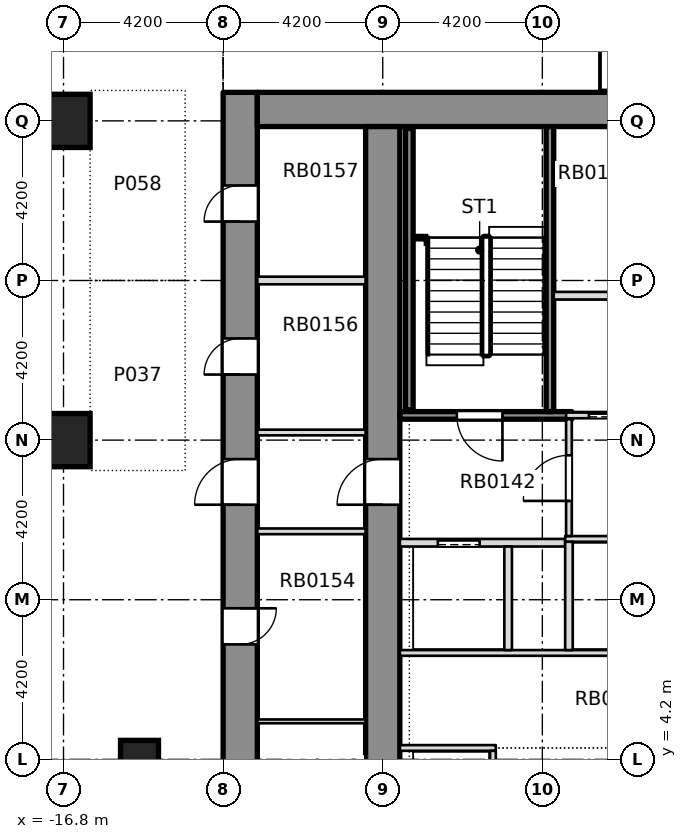
"""IFC4 building model, lengths in metres.
Left out: names, types, materials, properties, quantities, classifications, styles, units other than length and angle.
Written with IfcOpenShell. Run it as: python <this file> out.ifc"""

import sys

from ifc_helpers import new_model, si_unit, direction, frame, frame_2d, origin, origin_2d, place, context, subcontext, project, spatial, rectangle, extrude, element, fill, save


model = new_model("IFC4")
c1 = context("Model", 3, precision=1e-05, world=origin(), true_north=direction((0.0, 1.0)))
c2 = subcontext(c1, "Body", "Model", "MODEL_VIEW")
j1 = project(units=[si_unit("LENGTHUNIT", "METRE"), si_unit("PLANEANGLEUNIT", "RADIAN")], contexts=[c1])
p1 = place(None, origin())
s1 = spatial("IfcSite", under=j1, at=p1, CompositionType="ELEMENT")
p2 = place(p1, origin())
s2 = spatial("IfcBuilding", under=s1, at=p2, CompositionType="ELEMENT")
p3 = place(p2, frame((0.0, 0.0, -4.2)))
s3 = spatial("IfcBuildingStorey", under=s2, at=p3, CompositionType="ELEMENT", Elevation=-4.2)
p4 = place(p3, frame((-12.15, -8.4, -0.35), z_axis=(0.0, 0.0, 1.0), x_axis=(0.0, 1.0, 0.0)))
e1 = element("IfcWall", 1, at=p4, inside=s3, PredefinedType="SHEAR", context=c2, shape_type="SweptSolid", body=[
    extrude(rectangle(XDim=30.15, YDim=0.9, at=frame_2d((15.075, 0.0))), origin(), (0.0, 0.0, 1.0), 4.1),
])
p5 = place(p4, frame((3.425, 0.0, 0.35)))
e2 = element("IfcOpeningElement", 2, at=p5, cuts=e1, PredefinedType="OPENING", context=c2, shape_type="SweptSolid", body=[
    extrude(rectangle(XDim=0.95, YDim=2.1, at=frame_2d((0.475, 1.05))), frame((0.0, 0.46, 0.0), z_axis=(0.0, -1.0, 0.0), x_axis=(1.0, 0.0, 0.0)), (0.0, 0.0, 1.0), 0.92),
])
p6 = place(p4, frame((8.075, 0.0, 0.35)))
e3 = element("IfcOpeningElement", 3, at=p6, cuts=e1, PredefinedType="OPENING", context=c2, shape_type="SweptSolid", body=[
    extrude(rectangle(XDim=0.95, YDim=2.1, at=frame_2d((0.475, 1.05))), frame((0.0, 0.46, 0.0), z_axis=(0.0, -1.0, 0.0), x_axis=(1.0, 0.0, 0.0)), (0.0, 0.0, 1.0), 0.92),
])
p7 = place(p4, frame((11.425, 0.0, 0.35)))
e4 = element("IfcOpeningElement", 4, at=p7, cuts=e1, PredefinedType="OPENING", context=c2, shape_type="SweptSolid", body=[
    extrude(rectangle(XDim=0.95, YDim=2.1, at=frame_2d((0.475, 1.05))), frame((0.0, 0.46, 0.0), z_axis=(0.0, -1.0, 0.0), x_axis=(1.0, 0.0, 0.0)), (0.0, 0.0, 1.0), 0.92),
])
p8 = place(p4, frame((15.625, 0.0, 0.35)))
e5 = element("IfcOpeningElement", 5, at=p8, cuts=e1, PredefinedType="OPENING", context=c2, shape_type="SweptSolid", body=[
    extrude(rectangle(XDim=0.95, YDim=2.1, at=frame_2d((0.475, 1.05))), frame((0.0, 0.46, 0.0), z_axis=(0.0, -1.0, 0.0), x_axis=(1.0, 0.0, 0.0)), (0.0, 0.0, 1.0), 0.92),
])
p9 = place(p4, frame((22.725, 0.0, 0.35)))
e6 = element("IfcOpeningElement", 6, at=p9, cuts=e1, PredefinedType="OPENING", context=c2, shape_type="SweptSolid", body=[
    extrude(rectangle(XDim=0.95, YDim=2.1, at=frame_2d((0.475, 1.05))), frame((0.0, 0.46, 0.0), z_axis=(0.0, -1.0, 0.0), x_axis=(1.0, 0.0, 0.0)), (0.0, 0.0, 1.0), 0.92),
])
p10 = place(p4, frame((26.75, 0.0, 0.35)))
e7 = element("IfcOpeningElement", 7, at=p10, cuts=e1, PredefinedType="OPENING", context=c2, shape_type="SweptSolid", body=[
    extrude(rectangle(XDim=0.95, YDim=2.1, at=frame_2d((0.475, 1.05))), frame((0.0, 0.46, 0.0), z_axis=(0.0, -1.0, 0.0), x_axis=(1.0, 0.0, 0.0)), (0.0, 0.0, 1.0), 0.92),
])
p11 = place(p4, frame((19.3, 0.0, 0.35)))
e8 = element("IfcOpeningElement", 8, at=p11, cuts=e1, PredefinedType="OPENING", context=c2, shape_type="SweptSolid", body=[
    extrude(rectangle(XDim=1.2, YDim=2.1, at=frame_2d((0.6, 1.05))), frame((0.0, 0.46, 0.0), z_axis=(0.0, -1.0, 0.0), x_axis=(1.0, 0.0, 0.0)), (0.0, 0.0, 1.0), 0.92),
])
p12 = place(p3, frame((-11.7, 21.3, -0.35), z_axis=(0.0, 0.0, 1.0), x_axis=(1.0, 0.0, 0.0)))
e9 = element("IfcWall", 9, at=p12, inside=s3, PredefinedType="SOLIDWALL", context=c2, shape_type="SweptSolid", body=[
    extrude(rectangle(XDim=23.4, YDim=0.9, at=frame_2d((11.7, 0.0))), origin(), (0.0, 0.0, 1.0), 4.1),
])
p13 = place(p3, frame((-8.4, -7.5, -0.35), z_axis=(0.0, 0.0, 1.0), x_axis=(0.0, 1.0, 0.0)))
e10 = element("IfcWall", 10, at=p13, inside=s3, PredefinedType="SHEAR", context=c2, shape_type="SweptSolid", body=[
    extrude(rectangle(XDim=28.35, YDim=0.9, at=frame_2d((14.175, 0.0))), origin(), (0.0, 0.0, 1.0), 4.1),
])
p14 = place(p13, frame((18.4, 0.0, 0.35)))
e11 = element("IfcOpeningElement", 11, at=p14, cuts=e10, PredefinedType="OPENING", context=c2, shape_type="SweptSolid", body=[
    extrude(rectangle(XDim=1.2, YDim=2.1, at=frame_2d((0.6, 1.05))), frame((0.0, 0.46, 0.0), z_axis=(0.0, -1.0, 0.0), x_axis=(1.0, 0.0, 0.0)), (0.0, 0.0, 1.0), 0.92),
])
for number, where, z_axis, x_axis in (
    (12, (-16.8, 12.6, -0.35), (0.0, 0.0, 1.0), (1.0, 0.0, 0.0)),
    (13, (-16.8, 21.0, -0.35), (0.0, 0.0, 1.0), (1.0, 0.0, 0.0)),
):
    element("IfcColumn", number, at=place(p3, frame(where, z_axis=z_axis, x_axis=x_axis)), inside=s3, PredefinedType="COLUMN", context=c2, shape_type="SweptSolid", body=[
        extrude(rectangle(XDim=1.4, YDim=1.4, at=origin_2d()), origin(), (0.0, 0.0, 1.0), 4.1),
    ])
p15 = place(p3, frame((-14.8, 4.2, -0.35), z_axis=(0.0, 0.0, 1.0), x_axis=(1.0, 0.0, 0.0)))
e14 = element("IfcColumn", 14, at=p15, inside=s3, PredefinedType="COLUMN", context=c2, shape_type="SweptSolid", body=[
    extrude(rectangle(XDim=1.0, YDim=1.0, at=origin_2d()), origin(), (0.0, 0.0, 1.0), 4.1),
])
p16 = place(p3, frame((-7.949, 4.5, 0.0), z_axis=(0.0, 0.0, 1.0), x_axis=(1.0, 0.0, 0.0)))
e15 = element("IfcWall", 15, at=p16, inside=s3, PredefinedType="PARTITIONING", context=c2, shape_type="SweptSolid", body=[
    extrude(rectangle(XDim=2.524, YDim=0.15, at=frame_2d((1.262, 0.0))), origin(), (0.0, 0.0, 1.0), 3.75),
])
p17 = place(p3, frame((-7.949, 7.0, 0.0), z_axis=(0.0, 0.0, 1.0), x_axis=(1.0, 0.0, 0.0)))
e16 = element("IfcWall", 16, at=p17, inside=s3, PredefinedType="PARTITIONING", context=c2, shape_type="SweptSolid", body=[
    extrude(rectangle(XDim=15.898, YDim=0.15, at=frame_2d((7.949, 0.0))), origin(), (0.0, 0.0, 1.0), 3.75),
])
p18 = place(p17, frame((7.249, 0.0, 0.0)))
e17 = element("IfcOpeningElement", 17, at=p18, cuts=e16, PredefinedType="OPENING", context=c2, shape_type="SweptSolid", body=[
    extrude(rectangle(XDim=1.4, YDim=2.1, at=frame_2d((0.7, 1.05))), frame((0.0, 0.085, 0.0), z_axis=(0.0, -1.0, 0.0), x_axis=(1.0, 0.0, 0.0)), (0.0, 0.0, 1.0), 0.17),
])
p19 = place(p3, frame((-7.949, 9.9, 0.0), z_axis=(0.0, 0.0, 1.0), x_axis=(1.0, 0.0, 0.0)))
e18 = element("IfcWall", 18, at=p19, inside=s3, PredefinedType="PARTITIONING", context=c2, shape_type="SweptSolid", body=[
    extrude(rectangle(XDim=4.349, YDim=0.2, at=frame_2d((2.174, 0.0))), origin(), (0.0, 0.0, 1.0), 3.75),
])
p20 = place(p19, frame((0.999, 0.0, 0.0)))
e19 = element("IfcOpeningElement", 19, at=p20, cuts=e18, PredefinedType="OPENING", context=c2, shape_type="SweptSolid", body=[
    extrude(rectangle(XDim=1.1, YDim=2.1, at=frame_2d((0.55, 1.05))), frame((0.0, 0.11, 0.0), z_axis=(0.0, -1.0, 0.0), x_axis=(1.0, 0.0, 0.0)), (0.0, 0.0, 1.0), 0.22),
])
p21 = place(p3, frame((-3.6, 10.0, 0.0), z_axis=(0.0, 0.0, 1.0), x_axis=(1.0, 0.0, 0.0)))
e20 = element("IfcWall", 20, at=p21, inside=s3, PredefinedType="PARTITIONING", context=c2, shape_type="SweptSolid", body=[
    extrude(rectangle(XDim=7.2, YDim=0.15, at=frame_2d((3.6, 0.0))), origin(), (0.0, 0.0, 1.0), 3.75),
])
p22 = place(p21, frame((2.9, 0.0, 0.0)))
e21 = element("IfcOpeningElement", 21, at=p22, cuts=e20, PredefinedType="OPENING", context=c2, shape_type="SweptSolid", body=[
    extrude(rectangle(XDim=1.4, YDim=2.1, at=frame_2d((0.7, 1.05))), frame((0.0, 0.085, 0.0), z_axis=(0.0, -1.0, 0.0), x_axis=(1.0, 0.0, 0.0)), (0.0, 0.0, 1.0), 0.17),
])
p23 = place(p3, frame((-7.949, 13.25, 0.0), z_axis=(0.0, 0.0, 1.0), x_axis=(1.0, 0.0, 0.0)))
e22 = element("IfcWall", 22, at=p23, inside=s3, PredefinedType="SOLIDWALL", context=c2, shape_type="SweptSolid", body=[
    extrude(rectangle(XDim=4.524, YDim=0.2, at=frame_2d((2.262, 0.0))), origin(), (0.0, 0.0, 1.0), 3.75),
])
p24 = place(p23, frame((1.499, 0.0, 0.0)))
e23 = element("IfcOpeningElement", 23, at=p24, cuts=e22, PredefinedType="OPENING", context=c2, shape_type="SweptSolid", body=[
    extrude(rectangle(XDim=1.2, YDim=2.1, at=frame_2d((0.6, 1.05))), frame((0.0, 0.11, 0.0), z_axis=(0.0, -1.0, 0.0), x_axis=(1.0, 0.0, 0.0)), (0.0, 0.0, 1.0), 0.22),
])
p25 = place(p3, frame((-3.575, 13.25, 0.0), z_axis=(0.0, 0.0, 1.0), x_axis=(1.0, 0.0, 0.0)))
e24 = element("IfcWall", 24, at=p25, inside=s3, PredefinedType="PARTITIONING", context=c2, shape_type="SweptSolid", body=[
    extrude(rectangle(XDim=7.15, YDim=0.15, at=frame_2d((3.575, 0.0))), origin(), (0.0, 0.0, 1.0), 3.75),
])
p26 = place(p25, frame((0.6, 0.0, 0.0)))
e25 = element("IfcOpeningElement", 25, at=p26, cuts=e24, PredefinedType="OPENING", context=c2, shape_type="SweptSolid", body=[
    extrude(rectangle(XDim=1.2, YDim=2.1, at=frame_2d((0.6, 1.05))), frame((0.0, 0.085, 0.0), z_axis=(0.0, -1.0, 0.0), x_axis=(1.0, 0.0, 0.0)), (0.0, 0.0, 1.0), 0.17),
])
p27 = place(p25, frame((5.4, 0.0, 0.0)))
e26 = element("IfcOpeningElement", 26, at=p27, cuts=e24, PredefinedType="OPENING", context=c2, shape_type="SweptSolid", body=[
    extrude(rectangle(XDim=1.1, YDim=2.1, at=frame_2d((0.55, 1.05))), frame((0.0, 0.085, 0.0), z_axis=(0.0, -1.0, 0.0), x_axis=(1.0, 0.0, 0.0)), (0.0, 0.0, 1.0), 0.17),
])
p28 = place(p25, frame((2.975, 0.0, 0.0)))
e27 = element("IfcOpeningElement", 27, at=p28, cuts=e24, PredefinedType="OPENING", context=c2, shape_type="SweptSolid", body=[
    extrude(rectangle(XDim=1.2, YDim=2.1, at=frame_2d((0.6, 1.05))), frame((0.0, 0.085, 0.0), z_axis=(0.0, -1.0, 0.0), x_axis=(1.0, 0.0, 0.0)), (0.0, 0.0, 1.0), 0.17),
])
p29 = place(p3, frame((-3.9, 16.4, 0.0), z_axis=(0.0, 0.0, 1.0), x_axis=(1.0, 0.0, 0.0)))
e28 = element("IfcWall", 28, at=p29, inside=s3, PredefinedType="PARTITIONING", context=c2, shape_type="SweptSolid", body=[
    extrude(rectangle(XDim=3.05, YDim=0.2, at=frame_2d((1.525, 0.0))), origin(), (0.0, 0.0, 1.0), 3.75),
])
p30 = place(p3, frame((-5.5, -7.499, 0.0), z_axis=(0.0, 0.0, 1.0), x_axis=(0.0, 1.0, 0.0)))
e29 = element("IfcWall", 29, at=p30, inside=s3, PredefinedType="PARTITIONING", context=c2, shape_type="SweptSolid", body=[
    extrude(rectangle(XDim=11.924, YDim=0.15, at=frame_2d((5.962, 0.0))), origin(), (0.0, 0.0, 1.0), 3.75),
])
p31 = place(p30, frame((0.949, 0.0, 0.0)))
e30 = element("IfcOpeningElement", 30, at=p31, cuts=e29, PredefinedType="OPENING", context=c2, shape_type="SweptSolid", body=[
    extrude(rectangle(XDim=1.1, YDim=2.1, at=frame_2d((0.55, 1.05))), frame((0.0, 0.085, 0.0), z_axis=(0.0, -1.0, 0.0), x_axis=(1.0, 0.0, 0.0)), (0.0, 0.0, 1.0), 0.17),
])
p32 = place(p30, frame((3.949, 0.0, 0.0)))
e31 = element("IfcOpeningElement", 31, at=p32, cuts=e29, PredefinedType="OPENING", context=c2, shape_type="SweptSolid", body=[
    extrude(rectangle(XDim=1.1, YDim=2.1, at=frame_2d((0.55, 1.05))), frame((0.0, 0.085, 0.0), z_axis=(0.0, -1.0, 0.0), x_axis=(1.0, 0.0, 0.0)), (0.0, 0.0, 1.0), 0.17),
])
p33 = place(p30, frame((6.949, 0.0, 0.0)))
e32 = element("IfcOpeningElement", 32, at=p33, cuts=e29, PredefinedType="OPENING", context=c2, shape_type="SweptSolid", body=[
    extrude(rectangle(XDim=1.1, YDim=2.1, at=frame_2d((0.55, 1.05))), frame((0.0, 0.085, 0.0), z_axis=(0.0, -1.0, 0.0), x_axis=(1.0, 0.0, 0.0)), (0.0, 0.0, 1.0), 0.17),
])
p34 = place(p30, frame((9.949, 0.0, 0.0)))
e33 = element("IfcOpeningElement", 33, at=p34, cuts=e29, PredefinedType="OPENING", context=c2, shape_type="SweptSolid", body=[
    extrude(rectangle(XDim=1.1, YDim=2.1, at=frame_2d((0.55, 1.05))), frame((0.0, 0.085, 0.0), z_axis=(0.0, -1.0, 0.0), x_axis=(1.0, 0.0, 0.0)), (0.0, 0.0, 1.0), 0.17),
])
p35 = place(p3, frame((-5.1, 7.075, 0.0), z_axis=(0.0, 0.0, 1.0), x_axis=(0.0, 1.0, 0.0)))
e34 = element("IfcWall", 34, at=p35, inside=s3, PredefinedType="PARTITIONING", context=c2, shape_type="SweptSolid", body=[
    extrude(rectangle(XDim=2.725, YDim=0.2, at=frame_2d((1.363, 0.0))), origin(), (0.0, 0.0, 1.0), 3.75),
])
p36 = place(p3, frame((-4.0, 13.35, 0.0), z_axis=(0.0, 0.0, 1.0), x_axis=(0.0, 1.0, 0.0)))
e35 = element("IfcWall", 35, at=p36, inside=s3, PredefinedType="SOLIDWALL", context=c2, shape_type="SweptSolid", body=[
    extrude(rectangle(XDim=7.499, YDim=0.2, at=frame_2d((3.75, 0.0))), origin(), (0.0, 0.0, 1.0), 3.75),
])
p37 = place(p3, frame((-3.5, 7.075, 0.0), z_axis=(0.0, 0.0, 1.0), x_axis=(0.0, 1.0, 0.0)))
e36 = element("IfcWall", 36, at=p37, inside=s3, PredefinedType="PARTITIONING", context=c2, shape_type="SweptSolid", body=[
    extrude(rectangle(XDim=2.85, YDim=0.2, at=frame_2d((1.425, 0.0))), origin(), (0.0, 0.0, 1.0), 3.75),
])
p38 = place(p3, frame((-3.5, 10.075, 0.0), z_axis=(0.0, 0.0, 1.0), x_axis=(0.0, 1.0, 0.0)))
e37 = element("IfcWall", 37, at=p38, inside=s3, PredefinedType="PARTITIONING", context=c2, shape_type="SweptSolid", body=[
    extrude(rectangle(XDim=3.075, YDim=0.15, at=frame_2d((1.538, 0.0))), origin(), (0.0, 0.0, 1.0), 3.75),
])
p39 = place(p38, frame((0.925, 0.0, 0.0)))
e38 = element("IfcOpeningElement", 38, at=p39, cuts=e37, PredefinedType="OPENING", context=c2, shape_type="SweptSolid", body=[
    extrude(rectangle(XDim=1.2, YDim=2.1, at=frame_2d((0.6, 1.05))), frame((0.0, 0.085, 0.0), z_axis=(0.0, -1.0, 0.0), x_axis=(1.0, 0.0, 0.0)), (0.0, 0.0, 1.0), 0.17),
])
p40 = place(p3, frame((-11.699, 5.2, 0.0), z_axis=(0.0, 0.0, 1.0), x_axis=(1.0, 0.0, 0.0)))
e39 = element("IfcWall", 39, at=p40, inside=s3, PredefinedType="PARTITIONING", context=c2, shape_type="SweptSolid", body=[
    extrude(rectangle(XDim=2.848, YDim=0.1, at=frame_2d((1.424, 0.0))), origin(), (0.0, 0.0, 1.0), 3.75),
])
for number, where, z_axis, x_axis in (
    (40, (-11.699, 10.2, 0.0), (0.0, 0.0, 1.0), (1.0, 0.0, 0.0)),
    (41, (-11.699, 12.8, 0.0), (0.0, 0.0, 1.0), (1.0, 0.0, 0.0)),
):
    element("IfcWall", number, at=place(p3, frame(where, z_axis=z_axis, x_axis=x_axis)), inside=s3, PredefinedType="PARTITIONING", context=c2, shape_type="SweptSolid", body=[
        extrude(rectangle(XDim=2.848, YDim=0.15, at=frame_2d((1.424, 0.0))), origin(), (0.0, 0.0, 1.0), 3.75),
    ])
p41 = place(p3, frame((-11.699, 16.8, 0.0), z_axis=(0.0, 0.0, 1.0), x_axis=(1.0, 0.0, 0.0)))
e42 = element("IfcWall", 42, at=p41, inside=s3, PredefinedType="PARTITIONING", context=c2, shape_type="SweptSolid", body=[
    extrude(rectangle(XDim=2.848, YDim=0.2, at=frame_2d((1.424, 0.0))), origin(), (0.0, 0.0, 1.0), 3.75),
])
p42 = place(p3, frame((-7.7, 13.4, 0.0), z_axis=(0.0, 0.0, 1.0), x_axis=(0.0, 1.0, 0.0)))
e43 = element("IfcWall", 43, at=p42, inside=s3, PredefinedType="SOLIDWALL", context=c2, shape_type="SweptSolid", body=[
    extrude(rectangle(XDim=7.4, YDim=0.2, at=frame_2d((3.7, 0.0))), origin(), (0.0, 0.0, 1.0), 3.75),
])
p43 = place(p24, origin())
e44 = element("IfcDoor", 44, at=p43, inside=s3, OperationType="SINGLE_SWING_LEFT", PredefinedType="DOOR", context=c2, shape_type="SweptSolid", body=[
    extrude(rectangle(XDim=1.2, YDim=2.1, at=frame_2d((0.6, 1.05))), frame((0.0, 0.025, 0.0), z_axis=(0.0, -1.0, 0.0), x_axis=(1.0, 0.0, 0.0)), (0.0, 0.0, 1.0), 0.05),
])
fill(e23, e44)
p44 = place(p20, origin())
e45 = element("IfcDoor", 45, at=p44, inside=s3, OperationType="SLIDING_TO_RIGHT", PredefinedType="DOOR", context=c2, shape_type="SweptSolid", body=[
    extrude(rectangle(XDim=1.1, YDim=2.1, at=frame_2d((0.55, 1.05))), frame((0.0, 0.025, 0.0), z_axis=(0.0, -1.0, 0.0), x_axis=(1.0, 0.0, 0.0)), (0.0, 0.0, 1.0), 0.05),
])
fill(e19, e45)
p45 = place(p26, origin())
e46 = element("IfcDoor", 46, at=p45, inside=s3, OperationType="SLIDING_TO_RIGHT", PredefinedType="DOOR", context=c2, shape_type="SweptSolid", body=[
    extrude(rectangle(XDim=1.2, YDim=2.1, at=frame_2d((0.6, 1.05))), frame((0.0, 0.025, 0.0), z_axis=(0.0, -1.0, 0.0), x_axis=(1.0, 0.0, 0.0)), (0.0, 0.0, 1.0), 0.05),
])
fill(e25, e46)
p46 = place(p39, origin())
e47 = element("IfcDoor", 47, at=p46, inside=s3, OperationType="SINGLE_SWING_RIGHT", PredefinedType="DOOR", context=c2, shape_type="SweptSolid", body=[
    extrude(rectangle(XDim=1.2, YDim=2.1, at=frame_2d((0.6, 1.05))), frame((0.0, 0.025, 0.0), z_axis=(0.0, -1.0, 0.0), x_axis=(1.0, 0.0, 0.0)), (0.0, 0.0, 1.0), 0.05),
])
fill(e38, e47)
p47 = place(p8, origin())
e48 = element("IfcDoor", 48, at=p47, inside=s3, OperationType="SINGLE_SWING_LEFT", PredefinedType="DOOR", context=c2, shape_type="SweptSolid", body=[
    extrude(rectangle(XDim=0.95, YDim=2.1, at=frame_2d((0.475, 1.05))), frame((0.0, 0.025, 0.0), z_axis=(0.0, -1.0, 0.0), x_axis=(1.0, 0.0, 0.0)), (0.0, 0.0, 1.0), 0.05),
])
fill(e5, e48)
p48 = place(p9, origin())
e49 = element("IfcDoor", 49, at=p48, inside=s3, OperationType="SINGLE_SWING_LEFT", PredefinedType="DOOR", context=c2, shape_type="SweptSolid", body=[
    extrude(rectangle(XDim=0.95, YDim=2.1, at=frame_2d((0.475, 1.05))), frame((0.0, 0.025, 0.0), z_axis=(0.0, -1.0, 0.0), x_axis=(1.0, 0.0, 0.0)), (0.0, 0.0, 1.0), 0.05),
])
fill(e6, e49)
p49 = place(p10, origin())
e50 = element("IfcDoor", 50, at=p49, inside=s3, OperationType="SINGLE_SWING_LEFT", PredefinedType="DOOR", context=c2, shape_type="SweptSolid", body=[
    extrude(rectangle(XDim=0.95, YDim=2.1, at=frame_2d((0.475, 1.05))), frame((0.0, 0.025, 0.0), z_axis=(0.0, -1.0, 0.0), x_axis=(1.0, 0.0, 0.0)), (0.0, 0.0, 1.0), 0.05),
])
fill(e7, e50)
p50 = place(p11, origin())
e51 = element("IfcDoor", 51, at=p50, inside=s3, OperationType="SINGLE_SWING_LEFT", PredefinedType="DOOR", context=c2, shape_type="SweptSolid", body=[
    extrude(rectangle(XDim=1.2, YDim=2.1, at=frame_2d((0.6, 1.05))), frame((0.0, 0.025, 0.0), z_axis=(0.0, -1.0, 0.0), x_axis=(1.0, 0.0, 0.0)), (0.0, 0.0, 1.0), 0.05),
])
fill(e8, e51)
p51 = place(p14, origin())
e52 = element("IfcDoor", 52, at=p51, inside=s3, OperationType="SINGLE_SWING_LEFT", PredefinedType="DOOR", context=c2, shape_type="SweptSolid", body=[
    extrude(rectangle(XDim=1.2, YDim=2.1, at=frame_2d((0.6, 1.05))), frame((0.0, 0.025, 0.0), z_axis=(0.0, -1.0, 0.0), x_axis=(1.0, 0.0, 0.0)), (0.0, 0.0, 1.0), 0.05),
])
fill(e11, e52)
save(model, sys.argv[1])
